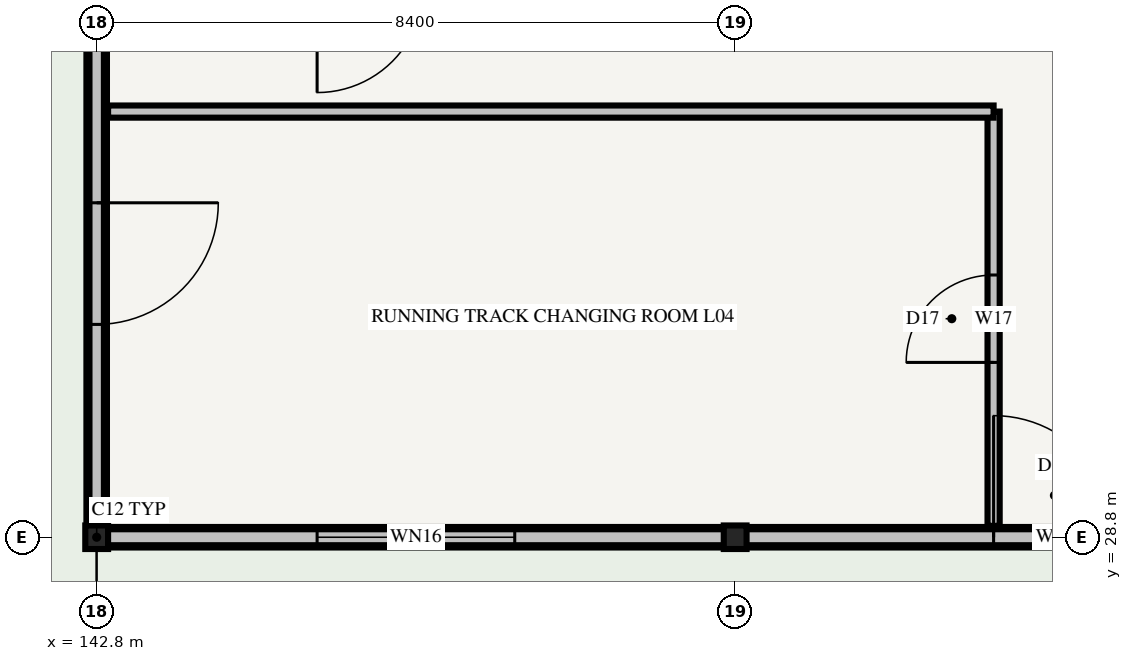
"""IFC4 building model, lengths in metres.
Left out: names, types, materials, properties, quantities, classifications, styles, units other than length and angle.
Written with IfcOpenShell. Run it as: python <this file> out.ifc"""

import sys

from ifc_helpers import new_model, si_unit, direction, frame, frame_2d, origin, origin_2d, place, context, subcontext, project, spatial, rectangle, i_section, extrude, element, fill, save


model = new_model("IFC4")
c1 = context("Model", 3, precision=1e-05, world=origin(), true_north=direction((0.0, 1.0)))
c2 = subcontext(c1, "Body", "Model", "MODEL_VIEW")
j1 = project(units=[si_unit("LENGTHUNIT", "METRE"), si_unit("PLANEANGLEUNIT", "RADIAN")], contexts=[c1])
p1 = place(None, origin())
s1 = spatial("IfcSite", under=j1, at=p1, CompositionType="ELEMENT")
p2 = place(p1, origin())
s2 = spatial("IfcBuilding", under=s1, at=p2, CompositionType="ELEMENT")
p3 = place(p2, frame((0.0, 0.0, 17.1)))
s3 = spatial("IfcBuildingStorey", under=s2, at=p3, CompositionType="ELEMENT", Elevation=17.1)
for number, where, z_axis, x_axis in (
    (1, (142.8, 28.8, 0.0), (0.0, 0.0, 1.0), (1.0, 0.0, 0.0)),
    (2, (151.2, 28.8, 0.0), (0.0, 0.0, 1.0), (1.0, 0.0, 0.0)),
):
    element("IfcColumn", number, at=place(p3, frame(where, z_axis=z_axis, x_axis=x_axis)), inside=s3, PredefinedType="COLUMN", context=c2, shape_type="SweptSolid", body=[
        extrude(i_section(OverallWidth=0.3, OverallDepth=0.31, WebThickness=0.009, FlangeThickness=0.015, FilletRadius=0.027, at=origin_2d()), origin(), (0.0, 0.0, 1.0), 4.2),
    ])
p4 = place(p3, frame((142.8, 28.8, 0.0), z_axis=(0.0, 0.0, 1.0), x_axis=(1.0, 0.0, 0.0)))
e3 = element("IfcWall", 3, at=p4, inside=s3, PredefinedType="STANDARD", context=c2, shape_type="SweptSolid", body=[
    extrude(rectangle(XDim=8.4, YDim=0.27, at=frame_2d((4.2, 0.0))), origin(), (0.0, 0.0, 1.0), 3.395),
])
p5 = place(p4, frame((2.9, 0.0, 0.85)))
e4 = element("IfcOpeningElement", 4, at=p5, cuts=e3, PredefinedType="OPENING", context=c2, shape_type="SweptSolid", body=[
    extrude(rectangle(XDim=2.6, YDim=2.0, at=frame_2d((1.3, 1.0))), frame((0.0, 0.16, 0.0), z_axis=(0.0, -1.0, 0.0), x_axis=(1.0, 0.0, 0.0)), (0.0, 0.0, 1.0), 0.32),
])
p6 = place(p3, frame((151.2, 28.8, 0.0), z_axis=(0.0, 0.0, 1.0), x_axis=(1.0, 0.0, 0.0)))
e5 = element("IfcWall", 5, at=p6, inside=s3, PredefinedType="STANDARD", context=c2, shape_type="SweptSolid", body=[
    extrude(rectangle(XDim=8.4, YDim=0.27, at=frame_2d((4.2, 0.0))), origin(), (0.0, 0.0, 1.0), 3.395),
])
p7 = place(p6, frame((3.4, 0.0, 0.0)))
e6 = element("IfcOpeningElement", 6, at=p7, cuts=e5, PredefinedType="OPENING", context=c2, shape_type="SweptSolid", body=[
    extrude(rectangle(XDim=1.6, YDim=2.3, at=frame_2d((0.8, 1.15))), frame((0.0, 0.16, 0.0), z_axis=(0.0, -1.0, 0.0), x_axis=(1.0, 0.0, 0.0)), (0.0, 0.0, 1.0), 0.32),
])
p8 = place(p3, frame((142.8, 36.0, 0.0), z_axis=(0.0, 0.0, 1.0), x_axis=(0.0, -1.0, 0.0)))
e7 = element("IfcWall", 7, at=p8, inside=s3, PredefinedType="STANDARD", context=c2, shape_type="SweptSolid", body=[
    extrude(rectangle(XDim=7.2, YDim=0.27, at=frame_2d((3.6, 0.0))), origin(), (0.0, 0.0, 1.0), 3.395),
])
p9 = place(p8, frame((2.8, 0.0, 0.0)))
e8 = element("IfcOpeningElement", 8, at=p9, cuts=e7, PredefinedType="OPENING", context=c2, shape_type="SweptSolid", body=[
    extrude(rectangle(XDim=1.6, YDim=2.3, at=frame_2d((0.8, 1.15))), frame((0.0, 0.16, 0.0), z_axis=(0.0, -1.0, 0.0), x_axis=(1.0, 0.0, 0.0)), (0.0, 0.0, 1.0), 0.32),
])
p10 = place(p3, frame((142.8, 28.8, 4.2), z_axis=(0.0, 0.0, 1.0), x_axis=(1.0, 0.0, 0.0)))
e9 = element("IfcWall", 9, at=p10, inside=s3, PredefinedType="PARAPET", context=c2, shape_type="SweptSolid", body=[
    extrude(rectangle(XDim=25.2, YDim=0.21, at=frame_2d((12.6, 0.0))), origin(), (0.0, 0.0, 1.0), 0.65),
])
p11 = place(p3, frame((142.8, 72.0, 4.2), z_axis=(0.0, 0.0, 1.0), x_axis=(0.0, -1.0, 0.0)))
e10 = element("IfcWall", 10, at=p11, inside=s3, PredefinedType="PARAPET", context=c2, shape_type="SweptSolid", body=[
    extrude(rectangle(XDim=43.2, YDim=0.19, at=frame_2d((21.6, 0.0))), origin(), (0.0, 0.0, 1.0), 0.65),
])
p12 = place(p3, frame((154.6, 28.95, 0.0), z_axis=(0.0, 0.0, 1.0), x_axis=(0.0, 1.0, 0.0)))
e11 = element("IfcWall", 11, at=p12, inside=s3, PredefinedType="PARTITIONING", context=c2, shape_type="SweptSolid", body=[
    extrude(rectangle(XDim=5.45, YDim=0.16, at=frame_2d((2.725, 0.0))), origin(), (0.0, 0.0, 1.0), 3.32),
])
p13 = place(p12, frame((2.15, 0.0, 0.0)))
e12 = element("IfcOpeningElement", 12, at=p13, cuts=e11, PredefinedType="OPENING", context=c2, shape_type="SweptSolid", body=[
    extrude(rectangle(XDim=1.15, YDim=2.15, at=frame_2d((0.575, 1.075))), frame((0.0, 0.105, 0.0), z_axis=(0.0, -1.0, 0.0), x_axis=(1.0, 0.0, 0.0)), (0.0, 0.0, 1.0), 0.21),
])
p14 = place(p3, frame((142.95, 34.4, 0.0), z_axis=(0.0, 0.0, 1.0), x_axis=(1.0, 0.0, 0.0)))
e13 = element("IfcWall", 13, at=p14, inside=s3, PredefinedType="PARTITIONING", context=c2, shape_type="SweptSolid", body=[
    extrude(rectangle(XDim=11.65, YDim=0.16, at=frame_2d((5.825, 0.0))), origin(), (0.0, 0.0, 1.0), 3.32),
])
p15 = place(p5, origin())
e14 = element("IfcWindow", 14, at=p15, inside=s3, PartitioningType="SINGLE_PANEL", PredefinedType="WINDOW", context=c2, shape_type="SweptSolid", body=[
    extrude(rectangle(XDim=2.6, YDim=2.0, at=frame_2d((1.3, 1.0))), frame((0.0, 0.03, 0.0), z_axis=(0.0, -1.0, 0.0), x_axis=(1.0, 0.0, 0.0)), (0.0, 0.0, 1.0), 0.06),
])
fill(e4, e14)
p16 = place(p7, frame((1.6, 0.0, 0.0), z_axis=(0.0, 0.0, 1.0), x_axis=(-1.0, 0.0, 0.0)))
e15 = element("IfcDoor", 15, at=p16, inside=s3, OperationType="DOUBLE_DOOR_SINGLE_SWING", PredefinedType="DOOR", context=c2, shape_type="SweptSolid", body=[
    extrude(rectangle(XDim=1.6, YDim=2.3, at=frame_2d((0.8, 1.15))), frame((0.0, 0.025, 0.0), z_axis=(0.0, -1.0, 0.0), x_axis=(1.0, 0.0, 0.0)), (0.0, 0.0, 1.0), 0.05),
])
fill(e6, e15)
p17 = place(p9, frame((1.6, 0.0, 0.0), z_axis=(0.0, 0.0, 1.0), x_axis=(-1.0, 0.0, 0.0)))
e16 = element("IfcDoor", 16, at=p17, inside=s3, OperationType="DOUBLE_DOOR_SINGLE_SWING", PredefinedType="DOOR", context=c2, shape_type="SweptSolid", body=[
    extrude(rectangle(XDim=1.6, YDim=2.3, at=frame_2d((0.8, 1.15))), frame((0.0, 0.025, 0.0), z_axis=(0.0, -1.0, 0.0), x_axis=(1.0, 0.0, 0.0)), (0.0, 0.0, 1.0), 0.05),
])
fill(e8, e16)
p18 = place(p13, origin())
e17 = element("IfcDoor", 17, at=p18, inside=s3, OperationType="SINGLE_SWING_LEFT", PredefinedType="DOOR", context=c2, shape_type="SweptSolid", body=[
    extrude(rectangle(XDim=1.15, YDim=2.15, at=frame_2d((0.575, 1.075))), frame((0.0, 0.025, 0.0), z_axis=(0.0, -1.0, 0.0), x_axis=(1.0, 0.0, 0.0)), (0.0, 0.0, 1.0), 0.05),
])
fill(e12, e17)
save(model, sys.argv[1])
